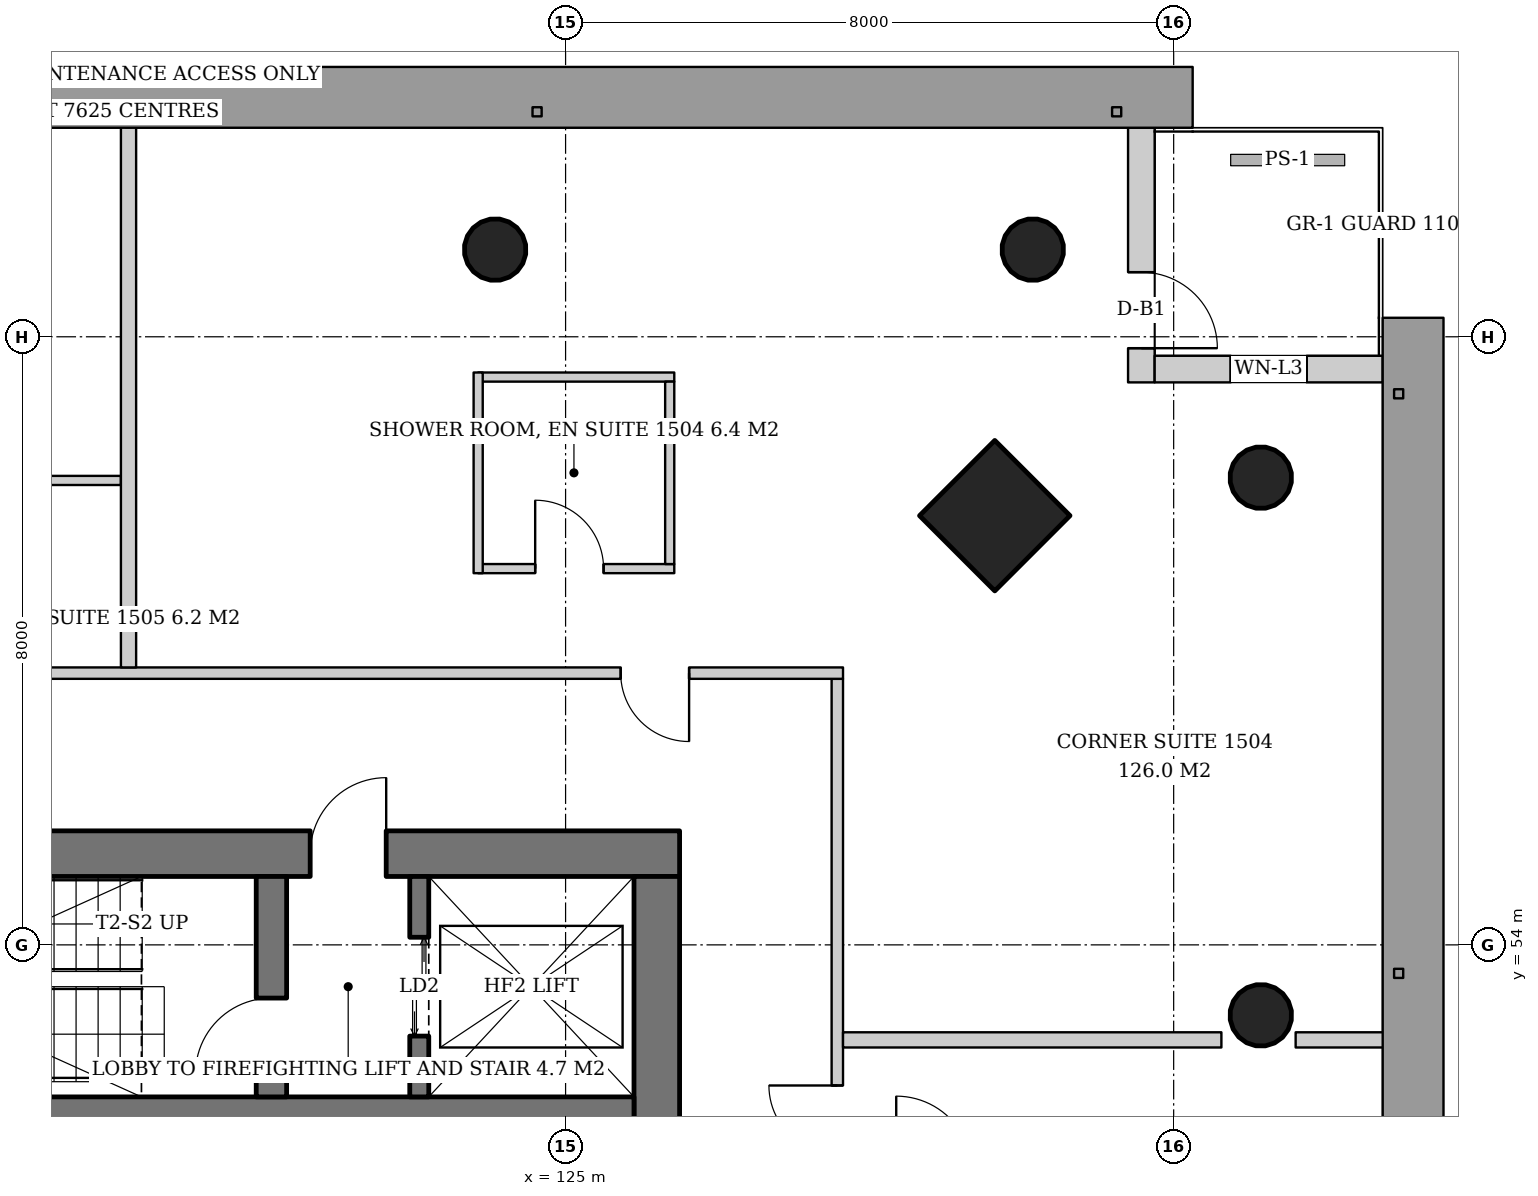
"""IFC4 building model, lengths in metres.
Left out: names, types, materials, properties, quantities, classifications, styles, units other than length and angle.
Written with IfcOpenShell. Run it as: python <this file> out.ifc"""

import sys

from ifc_helpers import new_model, si_unit, direction, frame, frame_2d, origin, origin_2d, place, context, subcontext, project, spatial, rectangle, hollow_circle, extrude, element, fill, save


model = new_model("IFC4")
c1 = context("Model", 3, precision=1e-05, world=origin(), true_north=direction((0.0, 1.0)))
c2 = subcontext(c1, "Body", "Model", "MODEL_VIEW")
j1 = project(units=[si_unit("LENGTHUNIT", "METRE"), si_unit("PLANEANGLEUNIT", "RADIAN")], contexts=[c1])
p1 = place(None, origin())
s1 = spatial("IfcSite", under=j1, at=p1, CompositionType="ELEMENT")
p2 = place(p1, origin())
s2 = spatial("IfcBuilding", under=s1, at=p2, CompositionType="ELEMENT")
p3 = place(p2, frame((0.0, 0.0, 62.8)))
s3 = spatial("IfcBuildingStorey", under=s2, at=p3, CompositionType="ELEMENT", Elevation=62.8)
p4 = place(p3, frame((130.698, 59.698, 0.0), z_axis=(-0.043029647111, -0.043029647111, 0.998146732169), x_axis=(0.707106781187, -0.707106781187, 0.0)))
e1 = element("IfcColumn", 1, at=p4, inside=s3, PredefinedType="COLUMN", context=c2, shape_type="SweptSolid", body=[
    extrude(rectangle(XDim=1.4, YDim=1.4, at=origin_2d()), origin(), (0.0, 0.0, 1.0), 3.807),
])
p5 = place(p3, frame((134.198, 60.198, 0.0), z_axis=(-0.043029647111, -0.043029647111, 0.998146732169), x_axis=(0.707106781187, -0.707106781187, 0.0)))
e2 = element("IfcColumn", 2, at=p5, inside=s3, PredefinedType="COLUMN", context=c2, shape_type="SweptSolid", body=[
    extrude(hollow_circle(Radius=0.406, WallThickness=0.03, at=origin_2d()), origin(), (0.0, 0.0, 1.0), 3.807),
])
p6 = place(p3, frame((134.198, 53.099, 0.0), z_axis=(-0.043059584825, -0.021497706284, 0.998841188968), x_axis=(0.446680166538, -0.894693706707, 0.0)))
e3 = element("IfcColumn", 3, at=p6, inside=s3, PredefinedType="COLUMN", context=c2, shape_type="SweptSolid", body=[
    extrude(hollow_circle(Radius=0.406, WallThickness=0.03, at=origin_2d()), origin(), (0.0, 0.0, 1.0), 3.804),
])
p7 = place(p3, frame((131.198, 63.198, 0.0), z_axis=(-0.043029647111, -0.043029647111, 0.998146732169), x_axis=(0.707106781187, -0.707106781187, 0.0)))
e4 = element("IfcColumn", 4, at=p7, inside=s3, PredefinedType="COLUMN", context=c2, shape_type="SweptSolid", body=[
    extrude(hollow_circle(Radius=0.406, WallThickness=0.03, at=origin_2d()), origin(), (0.0, 0.0, 1.0), 3.807),
])
p8 = place(p3, frame((124.099, 63.198, 0.0), z_axis=(-0.021497706284, -0.043059584825, 0.998841188968), x_axis=(0.894693706707, -0.446680166538, 0.0)))
e5 = element("IfcColumn", 5, at=p8, inside=s3, PredefinedType="COLUMN", context=c2, shape_type="SweptSolid", body=[
    extrude(hollow_circle(Radius=0.406, WallThickness=0.03, at=origin_2d()), origin(), (0.0, 0.0, 1.0), 3.804),
])
p9 = place(p3, frame((107.5, 55.2, 0.0), z_axis=(0.0, 0.0, 1.0), x_axis=(1.0, 0.0, 0.0)))
e6 = element("IfcWall", 6, at=p9, inside=s3, PredefinedType="SHEAR", context=c2, shape_type="SweptSolid", body=[
    extrude(rectangle(XDim=19.0, YDim=0.6, at=frame_2d((9.5, 0.0))), origin(), (0.0, 0.0, 1.0), 3.8),
])
p10 = place(p9, frame((14.14, 0.0, 0.0)))
e7 = element("IfcOpeningElement", 7, at=p10, cuts=e6, PredefinedType="OPENING", context=c2, shape_type="SweptSolid", body=[
    extrude(rectangle(XDim=1.0, YDim=2.1, at=frame_2d((0.5, 1.05))), frame((0.0, 0.31, 0.0), z_axis=(0.0, -1.0, 0.0), x_axis=(1.0, 0.0, 0.0)), (0.0, 0.0, 1.0), 0.62),
])
p11 = place(p9, frame((1.024, 0.0, 0.0)))
e8 = element("IfcOpeningElement", 8, at=p11, cuts=e6, PredefinedType="OPENING", context=c2, shape_type="SweptSolid", body=[
    extrude(rectangle(XDim=1.0, YDim=2.1, at=frame_2d((0.5, 1.05))), frame((0.0, 0.31, 0.0), z_axis=(0.0, -1.0, 0.0), x_axis=(1.0, 0.0, 0.0)), (0.0, 0.0, 1.0), 0.62),
])
p12 = place(p9, frame((3.262, 0.0, 0.0)))
e9 = element("IfcOpeningElement", 9, at=p12, cuts=e6, PredefinedType="OPENING", context=c2, shape_type="SweptSolid", body=[
    extrude(rectangle(XDim=1.0, YDim=2.1, at=frame_2d((0.5, 1.05))), frame((0.0, 0.31, 0.0), z_axis=(0.0, -1.0, 0.0), x_axis=(1.0, 0.0, 0.0)), (0.0, 0.0, 1.0), 0.62),
])
p13 = place(p3, frame((126.2, 37.1, 0.0), z_axis=(0.0, 0.0, 1.0), x_axis=(0.0, 1.0, 0.0)))
e10 = element("IfcWall", 10, at=p13, inside=s3, PredefinedType="SHEAR", context=c2, shape_type="SweptSolid", body=[
    extrude(rectangle(XDim=17.8, YDim=0.6, at=frame_2d((8.9, 0.0))), origin(), (0.0, 0.0, 1.0), 3.8),
])
p14 = place(p13, frame((8.0, 0.0, 0.0)))
e11 = element("IfcOpeningElement", 11, at=p14, cuts=e10, PredefinedType="OPENING", context=c2, shape_type="SweptSolid", body=[
    extrude(rectangle(XDim=1.8, YDim=2.4, at=frame_2d((0.9, 1.2))), frame((0.0, 0.31, 0.0), z_axis=(0.0, -1.0, 0.0), x_axis=(1.0, 0.0, 0.0)), (0.0, 0.0, 1.0), 0.62),
])
p15 = place(p3, frame((108.1, 51.8, 0.0), z_axis=(0.0, 0.0, 1.0), x_axis=(1.0, 0.0, 0.0)))
e12 = element("IfcWall", 12, at=p15, inside=s3, PredefinedType="SHEAR", context=c2, shape_type="SweptSolid", body=[
    extrude(rectangle(XDim=17.8, YDim=0.4, at=frame_2d((8.9, 0.0))), origin(), (0.0, 0.0, 1.0), 3.8),
])
p16 = place(p3, frame((121.13, 52.0, 0.0), z_axis=(0.0, 0.0, 1.0), x_axis=(0.0, 1.0, 0.0)))
e13 = element("IfcWall", 13, at=p16, inside=s3, PredefinedType="SHEAR", context=c2, shape_type="SweptSolid", body=[
    extrude(rectangle(XDim=2.9, YDim=0.4, at=frame_2d((1.45, 0.0))), origin(), (0.0, 0.0, 1.0), 3.8),
])
p17 = place(p16, frame((0.3, 0.0, 0.0)))
e14 = element("IfcOpeningElement", 14, at=p17, cuts=e13, PredefinedType="OPENING", context=c2, shape_type="SweptSolid", body=[
    extrude(rectangle(XDim=1.0, YDim=2.1, at=frame_2d((0.5, 1.05))), frame((0.0, 0.21, 0.0), z_axis=(0.0, -1.0, 0.0), x_axis=(1.0, 0.0, 0.0)), (0.0, 0.0, 1.0), 0.42),
])
p18 = place(p3, frame((132.575, 64.75, 0.0), z_axis=(0.0, 0.0, 1.0), x_axis=(0.0, -1.0, 0.0)))
e15 = element("IfcWall", 15, at=p18, inside=s3, PredefinedType="SOLIDWALL", context=c2, shape_type="SweptSolid", body=[
    extrude(rectangle(XDim=3.35, YDim=0.35, at=frame_2d((1.675, 0.0))), origin(), (0.0, 0.0, 1.0), 3.6),
])
p19 = place(p18, frame((1.9, 0.0, 0.0)))
e16 = element("IfcOpeningElement", 16, at=p19, cuts=e15, PredefinedType="OPENING", context=c2, shape_type="SweptSolid", body=[
    extrude(rectangle(XDim=1.0, YDim=2.4, at=frame_2d((0.5, 1.2))), frame((0.0, 0.185, 0.0), z_axis=(0.0, -1.0, 0.0), x_axis=(1.0, 0.0, 0.0)), (0.0, 0.0, 1.0), 0.37),
])
p20 = place(p3, frame((132.75, 61.575, 0.0), z_axis=(0.0, 0.0, 1.0), x_axis=(1.0, 0.0, 0.0)))
e17 = element("IfcWall", 17, at=p20, inside=s3, PredefinedType="SOLIDWALL", context=c2, shape_type="SweptSolid", body=[
    extrude(rectangle(XDim=3.0, YDim=0.35, at=frame_2d((1.5, 0.0))), origin(), (0.0, 0.0, 1.0), 3.6),
])
p21 = place(p20, frame((1.0, 0.0, 0.9)))
e18 = element("IfcOpeningElement", 18, at=p21, cuts=e17, PredefinedType="OPENING", context=c2, shape_type="SweptSolid", body=[
    extrude(rectangle(XDim=1.0, YDim=2.4, at=frame_2d((0.5, 1.2))), frame((0.0, 0.185, 0.0), z_axis=(0.0, -1.0, 0.0), x_axis=(1.0, 0.0, 0.0)), (0.0, 0.0, 1.0), 0.37),
])
p22 = place(p3, frame((123.075, 52.0, 0.0), z_axis=(0.0, 0.0, 1.0), x_axis=(0.0, 1.0, 0.0)))
e19 = element("IfcWall", 19, at=p22, inside=s3, PredefinedType="SHEAR", context=c2, shape_type="SweptSolid", body=[
    extrude(rectangle(XDim=2.9, YDim=0.25, at=frame_2d((1.45, 0.0))), origin(), (0.0, 0.0, 1.0), 3.8),
])
p23 = place(p22, frame((0.8, 0.0, 0.0)))
e20 = element("IfcOpeningElement", 20, at=p23, cuts=e19, PredefinedType="OPENING", context=c2, shape_type="SweptSolid", body=[
    extrude(rectangle(XDim=1.3, YDim=2.2, at=frame_2d((0.65, 1.1))), frame((0.0, 0.135, 0.0), z_axis=(0.0, -1.0, 0.0), x_axis=(1.0, 0.0, 0.0)), (0.0, 0.0, 1.0), 0.27),
])
p24 = place(p3, frame((128.575, 34.35, 0.0), z_axis=(0.0, 0.0, 1.0), x_axis=(0.0, 1.0, 0.0)))
e21 = element("IfcWall", 21, at=p24, inside=s3, PredefinedType="PARTITIONING", context=c2, shape_type="SweptSolid", body=[
    extrude(rectangle(XDim=23.15, YDim=0.15, at=frame_2d((11.575, 0.0))), origin(), (0.0, 0.0, 1.0), 2.8),
])
p25 = place(p24, frame((2.025, 0.0, 0.0)))
e22 = element("IfcOpeningElement", 22, at=p25, cuts=e21, PredefinedType="OPENING", context=c2, shape_type="SweptSolid", body=[
    extrude(rectangle(XDim=0.9, YDim=2.1, at=frame_2d((0.45, 1.05))), frame((0.0, 0.085, 0.0), z_axis=(0.0, -1.0, 0.0), x_axis=(1.0, 0.0, 0.0)), (0.0, 0.0, 1.0), 0.17),
])
p26 = place(p24, frame((7.65, 0.0, 0.0)))
e23 = element("IfcOpeningElement", 23, at=p26, cuts=e21, PredefinedType="OPENING", context=c2, shape_type="SweptSolid", body=[
    extrude(rectangle(XDim=0.9, YDim=2.1, at=frame_2d((0.45, 1.05))), frame((0.0, 0.085, 0.0), z_axis=(0.0, -1.0, 0.0), x_axis=(1.0, 0.0, 0.0)), (0.0, 0.0, 1.0), 0.17),
])
p27 = place(p24, frame((16.9, 0.0, 0.0)))
e24 = element("IfcOpeningElement", 24, at=p27, cuts=e21, PredefinedType="OPENING", context=c2, shape_type="SweptSolid", body=[
    extrude(rectangle(XDim=0.9, YDim=2.1, at=frame_2d((0.45, 1.05))), frame((0.0, 0.085, 0.0), z_axis=(0.0, -1.0, 0.0), x_axis=(1.0, 0.0, 0.0)), (0.0, 0.0, 1.0), 0.17),
])
p28 = place(p3, frame((128.65, 52.75, 0.0), z_axis=(0.0, 0.0, 1.0), x_axis=(1.0, 0.0, 0.0)))
e25 = element("IfcWall", 25, at=p28, inside=s3, PredefinedType="PARTITIONING", context=c2, shape_type="SweptSolid", body=[
    extrude(rectangle(XDim=4.978, YDim=0.2, at=frame_2d((2.489, 0.0))), origin(), (0.0, 0.0, 1.0), 3.6),
])
p29 = place(p3, frame((134.605, 52.75, 0.0), z_axis=(0.0, 0.0, 1.0), x_axis=(1.0, 0.0, 0.0)))
e26 = element("IfcWall", 26, at=p29, inside=s3, PredefinedType="PARTITIONING", context=c2, shape_type="SweptSolid", body=[
    extrude(rectangle(XDim=1.185, YDim=0.2, at=frame_2d((0.593, 0.0))), origin(), (0.0, 0.0, 1.0), 3.6),
])
p30 = place(p3, frame((123.85, 58.95, 0.0), z_axis=(0.0, 0.0, 1.0), x_axis=(1.0, 0.0, 0.0)))
e27 = element("IfcWall", 27, at=p30, inside=s3, PredefinedType="PARTITIONING", context=c2, shape_type="SweptSolid", body=[
    extrude(rectangle(XDim=2.58, YDim=0.12, at=frame_2d((1.29, 0.0))), origin(), (0.0, 0.0, 1.0), 2.8),
])
p31 = place(p30, frame((0.75, 0.0, 0.0)))
e28 = element("IfcOpeningElement", 28, at=p31, cuts=e27, PredefinedType="OPENING", context=c2, shape_type="SweptSolid", body=[
    extrude(rectangle(XDim=0.9, YDim=2.1, at=frame_2d((0.45, 1.05))), frame((0.0, 0.07, 0.0), z_axis=(0.0, -1.0, 0.0), x_axis=(1.0, 0.0, 0.0)), (0.0, 0.0, 1.0), 0.14),
])
p32 = place(p3, frame((123.85, 61.47, 0.0), z_axis=(0.0, 0.0, 1.0), x_axis=(1.0, 0.0, 0.0)))
e29 = element("IfcWall", 29, at=p32, inside=s3, PredefinedType="PARTITIONING", context=c2, shape_type="SweptSolid", body=[
    extrude(rectangle(XDim=2.58, YDim=0.12, at=frame_2d((1.29, 0.0))), origin(), (0.0, 0.0, 1.0), 2.8),
])
p33 = place(p3, frame((126.37, 59.01, 0.0), z_axis=(0.0, 0.0, 1.0), x_axis=(0.0, 1.0, 0.0)))
e30 = element("IfcWall", 30, at=p33, inside=s3, PredefinedType="PARTITIONING", context=c2, shape_type="SweptSolid", body=[
    extrude(rectangle(XDim=2.4, YDim=0.12, at=frame_2d((1.2, 0.0))), origin(), (0.0, 0.0, 1.0), 2.8),
])
p34 = place(p3, frame((123.85, 58.89, 0.0), z_axis=(0.0, 0.0, 1.0), x_axis=(0.0, 1.0, 0.0)))
e31 = element("IfcWall", 31, at=p34, inside=s3, PredefinedType="PARTITIONING", context=c2, shape_type="SweptSolid", body=[
    extrude(rectangle(XDim=2.64, YDim=0.12, at=frame_2d((1.32, 0.0))), origin(), (0.0, 0.0, 1.0), 3.6),
])
p35 = place(p3, frame((119.15, 60.11, 0.0), z_axis=(0.0, 0.0, 1.0), x_axis=(-1.0, 0.0, 0.0)))
e32 = element("IfcWall", 32, at=p35, inside=s3, PredefinedType="PARTITIONING", context=c2, shape_type="SweptSolid", body=[
    extrude(rectangle(XDim=2.42, YDim=0.12, at=frame_2d((1.21, 0.0))), origin(), (0.0, 0.0, 1.0), 2.847),
])
p36 = place(p3, frame((128.65, 57.575, 0.0), z_axis=(0.0, 0.0, 1.0), x_axis=(-1.0, 0.0, 0.0)))
e33 = element("IfcWall", 33, at=p36, inside=s3, PredefinedType="PARTITIONING", context=c2, shape_type="SweptSolid", body=[
    extrude(rectangle(XDim=23.15, YDim=0.15, at=frame_2d((11.575, 0.0))), origin(), (0.0, 0.0, 1.0), 2.8),
])
p37 = place(p36, frame((2.025, 0.0, 0.0)))
e34 = element("IfcOpeningElement", 34, at=p37, cuts=e33, PredefinedType="OPENING", context=c2, shape_type="SweptSolid", body=[
    extrude(rectangle(XDim=0.9, YDim=2.1, at=frame_2d((0.45, 1.05))), frame((0.0, 0.085, 0.0), z_axis=(0.0, -1.0, 0.0), x_axis=(1.0, 0.0, 0.0)), (0.0, 0.0, 1.0), 0.17),
])
p38 = place(p36, frame((12.15, 0.0, 0.0)))
e35 = element("IfcOpeningElement", 35, at=p38, cuts=e33, PredefinedType="OPENING", context=c2, shape_type="SweptSolid", body=[
    extrude(rectangle(XDim=0.9, YDim=2.1, at=frame_2d((0.45, 1.05))), frame((0.0, 0.085, 0.0), z_axis=(0.0, -1.0, 0.0), x_axis=(1.0, 0.0, 0.0)), (0.0, 0.0, 1.0), 0.17),
])
p39 = place(p36, frame((14.75, 0.0, 0.0)))
e36 = element("IfcOpeningElement", 36, at=p39, cuts=e33, PredefinedType="OPENING", context=c2, shape_type="SweptSolid", body=[
    extrude(rectangle(XDim=0.9, YDim=2.1, at=frame_2d((0.45, 1.05))), frame((0.0, 0.085, 0.0), z_axis=(0.0, -1.0, 0.0), x_axis=(1.0, 0.0, 0.0)), (0.0, 0.0, 1.0), 0.17),
])
p40 = place(p3, frame((119.25, 57.65, 0.0), z_axis=(0.0, 0.0, 1.0), x_axis=(0.0, 1.0, 0.0)))
e37 = element("IfcWall", 37, at=p40, inside=s3, PredefinedType="PARTITIONING", context=c2, shape_type="SweptSolid", body=[
    extrude(rectangle(XDim=7.14, YDim=0.2, at=frame_2d((3.57, 0.0))), origin(), (0.0, 0.0, 1.0), 3.05),
])
p41 = place(p19, origin())
e38 = element("IfcDoor", 38, at=p41, inside=s3, OperationType="SINGLE_SWING_RIGHT", PredefinedType="DOOR", context=c2, shape_type="SweptSolid", body=[
    extrude(rectangle(XDim=1.0, YDim=2.4, at=frame_2d((0.5, 1.2))), frame((0.0, 0.025, 0.0), z_axis=(0.0, -1.0, 0.0), x_axis=(1.0, 0.0, 0.0)), (0.0, 0.0, 1.0), 0.05),
])
fill(e16, e38)
p42 = place(p21, origin())
e39 = element("IfcWindow", 39, at=p42, inside=s3, PartitioningType="SINGLE_PANEL", PredefinedType="WINDOW", context=c2, shape_type="SweptSolid", body=[
    extrude(rectangle(XDim=1.0, YDim=2.4, at=frame_2d((0.5, 1.2))), frame((0.0, 0.03, 0.0), z_axis=(0.0, -1.0, 0.0), x_axis=(1.0, 0.0, 0.0)), (0.0, 0.0, 1.0), 0.06),
])
fill(e18, e39)
p43 = place(p23, origin())
e40 = element("IfcDoor", 40, at=p43, inside=s3, OperationType="DOUBLE_DOOR_SLIDING", PredefinedType="DOOR", context=c2, shape_type="SweptSolid", body=[
    extrude(rectangle(XDim=1.3, YDim=2.2, at=frame_2d((0.65, 1.1))), frame((0.0, 0.025, 0.0), z_axis=(0.0, -1.0, 0.0), x_axis=(1.0, 0.0, 0.0)), (0.0, 0.0, 1.0), 0.05),
])
fill(e20, e40)
p44 = place(p17, origin())
e41 = element("IfcDoor", 41, at=p44, inside=s3, OperationType="SINGLE_SWING_LEFT", PredefinedType="DOOR", context=c2, shape_type="SweptSolid", body=[
    extrude(rectangle(XDim=1.0, YDim=2.1, at=frame_2d((0.5, 1.05))), frame((0.0, 0.025, 0.0), z_axis=(0.0, -1.0, 0.0), x_axis=(1.0, 0.0, 0.0)), (0.0, 0.0, 1.0), 0.05),
])
fill(e14, e41)
p45 = place(p10, origin())
e42 = element("IfcDoor", 42, at=p45, inside=s3, OperationType="SINGLE_SWING_RIGHT", PredefinedType="DOOR", context=c2, shape_type="SweptSolid", body=[
    extrude(rectangle(XDim=1.0, YDim=2.1, at=frame_2d((0.5, 1.05))), frame((0.0, 0.025, 0.0), z_axis=(0.0, -1.0, 0.0), x_axis=(1.0, 0.0, 0.0)), (0.0, 0.0, 1.0), 0.05),
])
fill(e7, e42)
p46 = place(p27, origin())
e43 = element("IfcDoor", 43, at=p46, inside=s3, OperationType="SINGLE_SWING_RIGHT", PredefinedType="DOOR", context=c2, shape_type="SweptSolid", body=[
    extrude(rectangle(XDim=0.9, YDim=2.1, at=frame_2d((0.45, 1.05))), frame((0.0, 0.025, 0.0), z_axis=(0.0, -1.0, 0.0), x_axis=(1.0, 0.0, 0.0)), (0.0, 0.0, 1.0), 0.05),
])
fill(e24, e43)
p47 = place(p31, origin())
e44 = element("IfcDoor", 44, at=p47, inside=s3, OperationType="SINGLE_SWING_LEFT", PredefinedType="DOOR", context=c2, shape_type="SweptSolid", body=[
    extrude(rectangle(XDim=0.9, YDim=2.1, at=frame_2d((0.45, 1.05))), frame((0.0, 0.025, 0.0), z_axis=(0.0, -1.0, 0.0), x_axis=(1.0, 0.0, 0.0)), (0.0, 0.0, 1.0), 0.05),
])
fill(e28, e44)
p48 = place(p37, origin())
e45 = element("IfcDoor", 45, at=p48, inside=s3, OperationType="SINGLE_SWING_LEFT", PredefinedType="DOOR", context=c2, shape_type="SweptSolid", body=[
    extrude(rectangle(XDim=0.9, YDim=2.1, at=frame_2d((0.45, 1.05))), frame((0.0, 0.025, 0.0), z_axis=(0.0, -1.0, 0.0), x_axis=(1.0, 0.0, 0.0)), (0.0, 0.0, 1.0), 0.05),
])
fill(e34, e45)
save(model, sys.argv[1])
